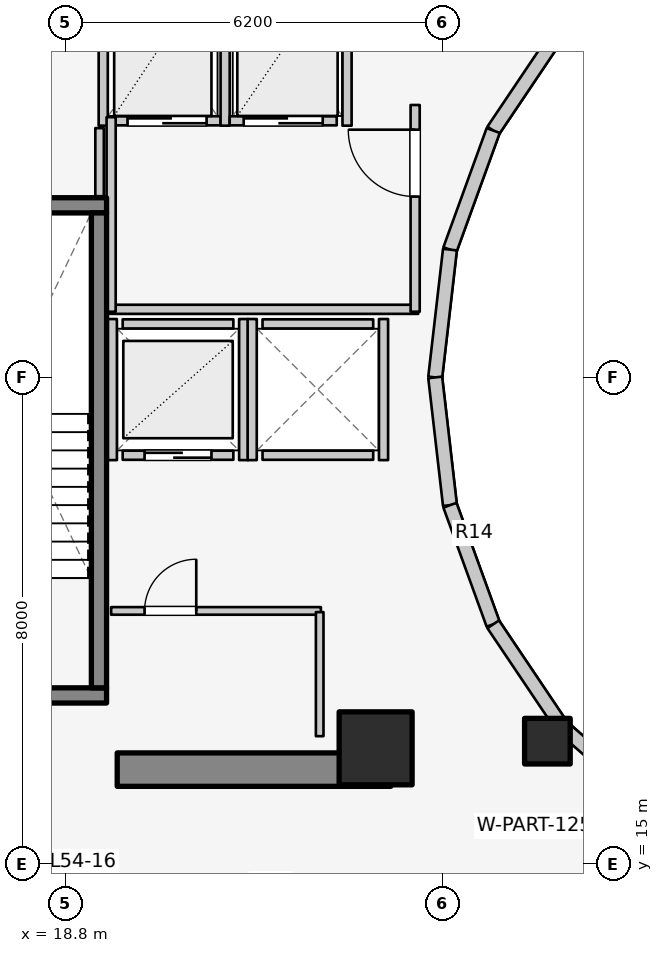
"""IFC4 building model, lengths in metres.
Left out: names, types, materials, properties, quantities, classifications, styles, units other than length and angle.
Written with IfcOpenShell. Run it as: python <this file> out.ifc"""

import sys

from ifc_helpers import new_model, si_unit, direction, frame, frame_2d, origin, origin_2d, place, context, subcontext, project, spatial, rectangle, extrude, element, fill, save


model = new_model("IFC4")
c1 = context("Model", 3, precision=1e-05, world=origin(), true_north=direction((0.0, 1.0)))
c2 = subcontext(c1, "Body", "Model", "MODEL_VIEW")
j1 = project(units=[si_unit("LENGTHUNIT", "METRE"), si_unit("PLANEANGLEUNIT", "RADIAN")], contexts=[c1])
p1 = place(None, origin())
s1 = spatial("IfcSite", under=j1, at=p1, CompositionType="ELEMENT")
p2 = place(p1, origin())
s2 = spatial("IfcBuilding", under=s1, at=p2, CompositionType="ELEMENT")
p3 = place(p2, frame((0.0, 0.0, 177.7)))
s3 = spatial("IfcBuildingStorey", under=s2, at=p3, CompositionType="ELEMENT", Elevation=177.7)
p4 = place(p3, frame((19.65, 16.55, 0.0), z_axis=(0.0, 0.0, 1.0), x_axis=(1.0, 0.0, 0.0)))
e1 = element("IfcWall", 1, at=p4, inside=s3, PredefinedType="SHEAR", context=c2, shape_type="SweptSolid", body=[
    extrude(rectangle(XDim=4.5, YDim=0.55, at=frame_2d((2.25, 0.0))), origin(), (0.0, 0.0, 1.0), 3.1),
])
p5 = place(p3, frame((16.105, 17.77, 0.0), z_axis=(0.0, 0.0, 1.0), x_axis=(1.0, 0.0, 0.0)))
e2 = element("IfcWall", 2, at=p5, inside=s3, PredefinedType="SOLIDWALL", context=c2, shape_type="SweptSolid", body=[
    extrude(rectangle(XDim=3.37, YDim=0.25, at=frame_2d((1.685, 0.0))), origin(), (0.0, 0.0, 1.0), 3.1),
])
p6 = place(p5, frame((1.135, 0.0, 0.0)))
e3 = element("IfcOpeningElement", 3, at=p6, cuts=e2, PredefinedType="OPENING", context=c2, shape_type="SweptSolid", body=[
    extrude(rectangle(XDim=1.1, YDim=2.1, at=frame_2d((0.55, 1.05))), frame((0.0, 0.135, 0.0), z_axis=(0.0, -1.0, 0.0), x_axis=(1.0, 0.0, 0.0)), (0.0, 0.0, 1.0), 0.27),
])
p7 = place(p3, frame((16.105, 25.83, 0.0), z_axis=(0.0, 0.0, 1.0), x_axis=(1.0, 0.0, 0.0)))
e4 = element("IfcWall", 4, at=p7, inside=s3, PredefinedType="SOLIDWALL", context=c2, shape_type="SweptSolid", body=[
    extrude(rectangle(XDim=3.37, YDim=0.25, at=frame_2d((1.685, 0.0))), origin(), (0.0, 0.0, 1.0), 3.1),
])
p8 = place(p3, frame((19.35, 17.895, 0.0), z_axis=(0.0, 0.0, 1.0), x_axis=(0.0, 1.0, 0.0)))
e5 = element("IfcWall", 5, at=p8, inside=s3, PredefinedType="SOLIDWALL", context=c2, shape_type="SweptSolid", body=[
    extrude(rectangle(XDim=7.81, YDim=0.25, at=frame_2d((3.905, 0.0))), origin(), (0.0, 0.0, 1.0), 3.1),
])
p9 = place(p3, frame((23.9, 16.9, 0.0), z_axis=(0.0, 0.0, 1.0), x_axis=(1.0, 0.0, 0.0)))
e6 = element("IfcColumn", 6, at=p9, inside=s3, PredefinedType="COLUMN", context=c2, shape_type="SweptSolid", body=[
    extrude(rectangle(XDim=1.2, YDim=1.2, at=origin_2d()), origin(), (0.0, 0.0, 1.0), 3.1),
])
p10 = place(p3, frame((26.725, 17.018, 0.0), z_axis=(0.0, 0.0, 1.0), x_axis=(1.0, 0.0, 0.0)))
e7 = element("IfcColumn", 7, at=p10, inside=s3, PredefinedType="COLUMN", context=c2, shape_type="SweptSolid", body=[
    extrude(rectangle(XDim=0.75, YDim=0.75, at=origin_2d()), origin(), (0.0, 0.0, 1.0), 3.1),
])
p11 = place(p3, frame((26.965, 28.742, 0.0), z_axis=(0.0, 0.0, 1.0), x_axis=(-0.558197800898, -0.829707909492, 0.0)))
e8 = element("IfcWall", 8, at=p11, inside=s3, PredefinedType="STANDARD", context=c2, shape_type="SweptSolid", body=[
    extrude(rectangle(XDim=2.027, YDim=0.23, at=frame_2d((1.013, 0.0))), origin(), (0.0, 0.0, 1.0), 1.22),
])
p12 = place(p3, frame((25.834, 27.06, 0.0), z_axis=(0.0, 0.0, 1.0), x_axis=(-0.341423187295, -0.93990968033, 0.0)))
e9 = element("IfcWall", 9, at=p12, inside=s3, PredefinedType="STANDARD", context=c2, shape_type="SweptSolid", body=[
    extrude(rectangle(XDim=2.084, YDim=0.23, at=frame_2d((1.042, 0.0))), origin(), (0.0, 0.0, 1.0), 2.56),
])
for number, where, z_axis, x_axis in (
    (10, (25.123, 25.102, 0.0), (0.0, 0.0, 1.0), (-0.115, -0.993, 0.0)),
    (11, (24.88, 23.0, 0.0), (0.0, 0.0, 1.0), (0.115, -0.993, 0.0)),
):
    element("IfcWall", number, at=place(p3, frame(where, z_axis=z_axis, x_axis=x_axis)), inside=s3, PredefinedType="STANDARD", context=c2, shape_type="SweptSolid", body=[
        extrude(rectangle(XDim=2.115, YDim=0.23, at=frame_2d((1.058, 0.0))), origin(), (0.0, 0.0, 1.0), 2.56),
    ])
p13 = place(p3, frame((25.123, 20.898, 0.0), z_axis=(0.0, 0.0, 1.0), x_axis=(0.341423187295, -0.93990968033, 0.0)))
e12 = element("IfcWall", 12, at=p13, inside=s3, PredefinedType="STANDARD", context=c2, shape_type="SweptSolid", body=[
    extrude(rectangle(XDim=2.084, YDim=0.23, at=frame_2d((1.042, 0.0))), origin(), (0.0, 0.0, 1.0), 2.56),
])
p14 = place(p3, frame((25.834, 18.94, 0.0), z_axis=(0.0, 0.0, 1.0), x_axis=(0.558197800898, -0.829707909492, 0.0)))
e13 = element("IfcWall", 13, at=p14, inside=s3, PredefinedType="STANDARD", context=c2, shape_type="SweptSolid", body=[
    extrude(rectangle(XDim=2.027, YDim=0.23, at=frame_2d((1.013, 0.0))), origin(), (0.0, 0.0, 1.0), 1.22),
])
p15 = place(p3, frame((26.965, 17.258, 0.0), z_axis=(0.0, 0.0, 1.0), x_axis=(0.752576694707, -0.658504607869, 0.0)))
e14 = element("IfcWall", 14, at=p15, inside=s3, PredefinedType="STANDARD", context=c2, shape_type="SweptSolid", body=[
    extrude(rectangle(XDim=1.959, YDim=0.23, at=frame_2d((0.98, 0.0))), origin(), (0.0, 0.0, 1.0), 1.22),
])
p16 = place(p3, frame((19.74, 21.72, 0.0), z_axis=(0.0, 0.0, 1.0), x_axis=(1.0, 0.0, 0.0)))
e15 = element("IfcWall", 15, at=p16, inside=s3, PredefinedType="SOLIDWALL", context=c2, shape_type="SweptSolid", body=[
    extrude(rectangle(XDim=1.82, YDim=0.15, at=frame_2d((0.91, 0.0))), origin(), (0.0, 0.0, 1.0), 2.575),
])
p17 = place(p16, frame((0.36, 0.0, 0.0)))
e16 = element("IfcOpeningElement", 16, at=p17, cuts=e15, PredefinedType="OPENING", context=c2, shape_type="SweptSolid", body=[
    extrude(rectangle(XDim=1.1, YDim=2.1, at=frame_2d((0.55, 1.05))), frame((0.0, 0.085, 0.0), z_axis=(0.0, -1.0, 0.0), x_axis=(1.0, 0.0, 0.0)), (0.0, 0.0, 1.0), 0.17),
])
p18 = place(p3, frame((19.74, 23.88, 0.0), z_axis=(0.0, 0.0, 1.0), x_axis=(1.0, 0.0, 0.0)))
e17 = element("IfcWall", 17, at=p18, inside=s3, PredefinedType="SOLIDWALL", context=c2, shape_type="SweptSolid", body=[
    extrude(rectangle(XDim=1.82, YDim=0.15, at=frame_2d((0.91, 0.0))), origin(), (0.0, 0.0, 1.0), 2.575),
])
for number, where, z_axis, x_axis in (
    (18, (19.57, 21.64, 0.0), (0.0, 0.0, 1.0), (0.0, 1.0, 0.0)),
    (19, (21.73, 21.64, 0.0), (0.0, 0.0, 1.0), (0.0, 1.0, 0.0)),
):
    element("IfcWall", number, at=place(p3, frame(where, z_axis=z_axis, x_axis=x_axis)), inside=s3, PredefinedType="SOLIDWALL", context=c2, shape_type="SweptSolid", body=[
        extrude(rectangle(XDim=2.32, YDim=0.15, at=frame_2d((1.16, 0.0))), origin(), (0.0, 0.0, 1.0), 2.575),
    ])
for number, where, z_axis, x_axis in (
    (20, (22.04, 21.72, 0.0), (0.0, 0.0, 1.0), (1.0, 0.0, 0.0)),
    (21, (22.04, 23.88, 0.0), (0.0, 0.0, 1.0), (1.0, 0.0, 0.0)),
):
    element("IfcWall", number, at=place(p3, frame(where, z_axis=z_axis, x_axis=x_axis)), inside=s3, PredefinedType="SOLIDWALL", context=c2, shape_type="SweptSolid", body=[
        extrude(rectangle(XDim=1.82, YDim=0.15, at=frame_2d((0.91, 0.0))), origin(), (0.0, 0.0, 1.0), 2.12),
    ])
p19 = place(p3, frame((21.87, 21.64, 0.0), z_axis=(0.0, 0.0, 1.0), x_axis=(0.0, 1.0, 0.0)))
e22 = element("IfcWall", 22, at=p19, inside=s3, PredefinedType="SOLIDWALL", context=c2, shape_type="SweptSolid", body=[
    extrude(rectangle(XDim=2.32, YDim=0.15, at=frame_2d((1.16, 0.0))), origin(), (0.0, 0.0, 1.0), 2.575),
])
p20 = place(p3, frame((24.03, 21.64, 0.0), z_axis=(0.0, 0.0, 1.0), x_axis=(0.0, 1.0, 0.0)))
e23 = element("IfcWall", 23, at=p20, inside=s3, PredefinedType="SOLIDWALL", context=c2, shape_type="SweptSolid", body=[
    extrude(rectangle(XDim=2.32, YDim=0.15, at=frame_2d((1.16, 0.0))), origin(), (0.0, 0.0, 1.0), 2.12),
])
p21 = place(p3, frame((19.59, 27.22, 0.0), z_axis=(0.0, 0.0, 1.0), x_axis=(1.0, 0.0, 0.0)))
e24 = element("IfcWall", 24, at=p21, inside=s3, PredefinedType="SOLIDWALL", context=c2, shape_type="SweptSolid", body=[
    extrude(rectangle(XDim=1.76, YDim=0.15, at=frame_2d((0.88, 0.0))), origin(), (0.0, 0.0, 1.0), 2.575),
])
p22 = place(p21, frame((0.23, 0.0, 0.0)))
e25 = element("IfcOpeningElement", 25, at=p22, cuts=e24, PredefinedType="OPENING", context=c2, shape_type="SweptSolid", body=[
    extrude(rectangle(XDim=1.3, YDim=2.1, at=frame_2d((0.65, 1.05))), frame((0.0, 0.085, 0.0), z_axis=(0.0, -1.0, 0.0), x_axis=(1.0, 0.0, 0.0)), (0.0, 0.0, 1.0), 0.17),
])
for number, where, z_axis, x_axis in (
    (26, (19.42, 27.14, 0.0), (0.0, 0.0, 1.0), (0.0, 1.0, 0.0)),
    (27, (21.425, 27.14, 0.0), (0.0, 0.0, 1.0), (0.0, 1.0, 0.0)),
):
    element("IfcWall", number, at=place(p3, frame(where, z_axis=z_axis, x_axis=x_axis)), inside=s3, PredefinedType="SOLIDWALL", context=c2, shape_type="SweptSolid", body=[
        extrude(rectangle(XDim=2.72, YDim=0.15, at=frame_2d((1.36, 0.0))), origin(), (0.0, 0.0, 1.0), 2.575),
    ])
p23 = place(p3, frame((21.5, 27.22, 0.0), z_axis=(0.0, 0.0, 1.0), x_axis=(1.0, 0.0, 0.0)))
e28 = element("IfcWall", 28, at=p23, inside=s3, PredefinedType="SOLIDWALL", context=c2, shape_type="SweptSolid", body=[
    extrude(rectangle(XDim=1.76, YDim=0.15, at=frame_2d((0.88, 0.0))), origin(), (0.0, 0.0, 1.0), 2.575),
])
p24 = place(p23, frame((0.23, 0.0, 0.0)))
e29 = element("IfcOpeningElement", 29, at=p24, cuts=e28, PredefinedType="OPENING", context=c2, shape_type="SweptSolid", body=[
    extrude(rectangle(XDim=1.3, YDim=2.1, at=frame_2d((0.65, 1.05))), frame((0.0, 0.085, 0.0), z_axis=(0.0, -1.0, 0.0), x_axis=(1.0, 0.0, 0.0)), (0.0, 0.0, 1.0), 0.17),
])
p25 = place(p3, frame((23.43, 27.14, 0.0), z_axis=(0.0, 0.0, 1.0), x_axis=(0.0, 1.0, 0.0)))
e30 = element("IfcWall", 30, at=p25, inside=s3, PredefinedType="SOLIDWALL", context=c2, shape_type="SweptSolid", body=[
    extrude(rectangle(XDim=2.72, YDim=0.15, at=frame_2d((1.36, 0.0))), origin(), (0.0, 0.0, 1.0), 2.575),
])
p26 = place(p3, frame((19.52, 24.12, 0.0), z_axis=(0.0, 0.0, 1.0), x_axis=(1.0, 0.0, 0.0)))
e31 = element("IfcWall", 31, at=p26, inside=s3, PredefinedType="PARTITIONING", context=c2, shape_type="SweptSolid", body=[
    extrude(rectangle(XDim=5.08, YDim=0.15, at=frame_2d((2.54, 0.0))), origin(), (0.0, 0.0, 1.0), 2.12),
])
p27 = place(p3, frame((19.55, 24.08, 0.0), z_axis=(0.0, 0.0, 1.0), x_axis=(0.0, 1.0, 0.0)))
e32 = element("IfcWall", 32, at=p27, inside=s3, PredefinedType="PARTITIONING", context=c2, shape_type="SweptSolid", body=[
    extrude(rectangle(XDim=3.2, YDim=0.15, at=frame_2d((1.6, 0.0))), origin(), (0.0, 0.0, 1.0), 2.575),
])
p28 = place(p3, frame((24.55, 24.08, 0.0), z_axis=(0.0, 0.0, 1.0), x_axis=(0.0, 1.0, 0.0)))
e33 = element("IfcWall", 33, at=p28, inside=s3, PredefinedType="PARTITIONING", context=c2, shape_type="SweptSolid", body=[
    extrude(rectangle(XDim=3.4, YDim=0.15, at=frame_2d((1.7, 0.0))), origin(), (0.0, 0.0, 1.0), 2.575),
])
p29 = place(p28, frame((1.894, 0.0, 0.0)))
e34 = element("IfcOpeningElement", 34, at=p29, cuts=e33, PredefinedType="OPENING", context=c2, shape_type="SweptSolid", body=[
    extrude(rectangle(XDim=1.1, YDim=2.1, at=frame_2d((0.55, 1.05))), frame((0.0, 0.085, 0.0), z_axis=(0.0, -1.0, 0.0), x_axis=(1.0, 0.0, 0.0)), (0.0, 0.0, 1.0), 0.17),
])
p30 = place(p3, frame((19.55, 19.16, 0.0), z_axis=(0.0, 0.0, 1.0), x_axis=(1.0, 0.0, 0.0)))
e35 = element("IfcWall", 35, at=p30, inside=s3, PredefinedType="PARTITIONING", context=c2, shape_type="SweptSolid", body=[
    extrude(rectangle(XDim=3.45, YDim=0.125, at=frame_2d((1.725, 0.0))), origin(), (0.0, 0.0, 1.0), 2.12),
])
p31 = place(p30, frame((0.55, 0.0, 0.0)))
e36 = element("IfcOpeningElement", 36, at=p31, cuts=e35, PredefinedType="OPENING", context=c2, shape_type="SweptSolid", body=[
    extrude(rectangle(XDim=0.85, YDim=2.05, at=frame_2d((0.425, 1.025))), frame((0.0, 0.073, 0.0), z_axis=(0.0, -1.0, 0.0), x_axis=(1.0, 0.0, 0.0)), (0.0, 0.0, 1.0), 0.145),
])
p32 = place(p3, frame((22.98, 17.1, 0.0), z_axis=(0.0, 0.0, 1.0), x_axis=(0.0, 1.0, 0.0)))
e37 = element("IfcWall", 37, at=p32, inside=s3, PredefinedType="PARTITIONING", context=c2, shape_type="SweptSolid", body=[
    extrude(rectangle(XDim=2.04, YDim=0.125, at=frame_2d((1.02, 0.0))), origin(), (0.0, 0.0, 1.0), 2.575),
])
p33 = place(p3, frame((19.36, 25.98, 0.0), z_axis=(0.0, 0.0, 1.0), x_axis=(0.0, 1.0, 0.0)))
e38 = element("IfcWall", 38, at=p33, inside=s3, PredefinedType="PLUMBINGWALL", context=c2, shape_type="SweptSolid", body=[
    extrude(rectangle(XDim=1.12, YDim=0.14, at=frame_2d((0.56, 0.0))), origin(), (0.0, 0.0, 1.0), 2.575),
])
p34 = place(p3, frame((28.45, 15.985, 0.0), z_axis=(0.0, 0.0, 1.0), x_axis=(-0.523587550846, -0.851971875474, 0.0)))
e39 = element("IfcWall", 39, at=p34, inside=s3, PredefinedType="PARTITIONING", context=c2, shape_type="SweptSolid", body=[
    extrude(rectangle(XDim=3.153, YDim=0.125, at=frame_2d((1.577, 0.0))), origin(), (0.0, 0.0, 1.0), 2.019),
])
p35 = place(p17, origin())
e40 = element("IfcDoor", 40, at=p35, inside=s3, OperationType="DOUBLE_DOOR_SLIDING", PredefinedType="DOOR", context=c2, shape_type="SweptSolid", body=[
    extrude(rectangle(XDim=1.1, YDim=2.1, at=frame_2d((0.55, 1.05))), frame((0.0, 0.025, 0.0), z_axis=(0.0, -1.0, 0.0), x_axis=(1.0, 0.0, 0.0)), (0.0, 0.0, 1.0), 0.05),
])
fill(e16, e40)
p36 = place(p22, origin())
e41 = element("IfcDoor", 41, at=p36, inside=s3, OperationType="DOUBLE_DOOR_SLIDING", PredefinedType="DOOR", context=c2, shape_type="SweptSolid", body=[
    extrude(rectangle(XDim=1.3, YDim=2.1, at=frame_2d((0.65, 1.05))), frame((0.0, 0.025, 0.0), z_axis=(0.0, -1.0, 0.0), x_axis=(1.0, 0.0, 0.0)), (0.0, 0.0, 1.0), 0.05),
])
fill(e25, e41)
p37 = place(p24, origin())
e42 = element("IfcDoor", 42, at=p37, inside=s3, OperationType="DOUBLE_DOOR_SLIDING", PredefinedType="DOOR", context=c2, shape_type="SweptSolid", body=[
    extrude(rectangle(XDim=1.3, YDim=2.1, at=frame_2d((0.65, 1.05))), frame((0.0, 0.025, 0.0), z_axis=(0.0, -1.0, 0.0), x_axis=(1.0, 0.0, 0.0)), (0.0, 0.0, 1.0), 0.05),
])
fill(e29, e42)
p38 = place(p29, origin())
e43 = element("IfcDoor", 43, at=p38, inside=s3, OperationType="SINGLE_SWING_RIGHT", PredefinedType="DOOR", context=c2, shape_type="SweptSolid", body=[
    extrude(rectangle(XDim=1.1, YDim=2.1, at=frame_2d((0.55, 1.05))), frame((0.0, 0.025, 0.0), z_axis=(0.0, -1.0, 0.0), x_axis=(1.0, 0.0, 0.0)), (0.0, 0.0, 1.0), 0.05),
])
fill(e34, e43)
p39 = place(p31, origin())
e44 = element("IfcDoor", 44, at=p39, inside=s3, OperationType="SINGLE_SWING_RIGHT", PredefinedType="DOOR", context=c2, shape_type="SweptSolid", body=[
    extrude(rectangle(XDim=0.85, YDim=2.05, at=frame_2d((0.425, 1.025))), frame((0.0, 0.025, 0.0), z_axis=(0.0, -1.0, 0.0), x_axis=(1.0, 0.0, 0.0)), (0.0, 0.0, 1.0), 0.05),
])
fill(e36, e44)
save(model, sys.argv[1])
